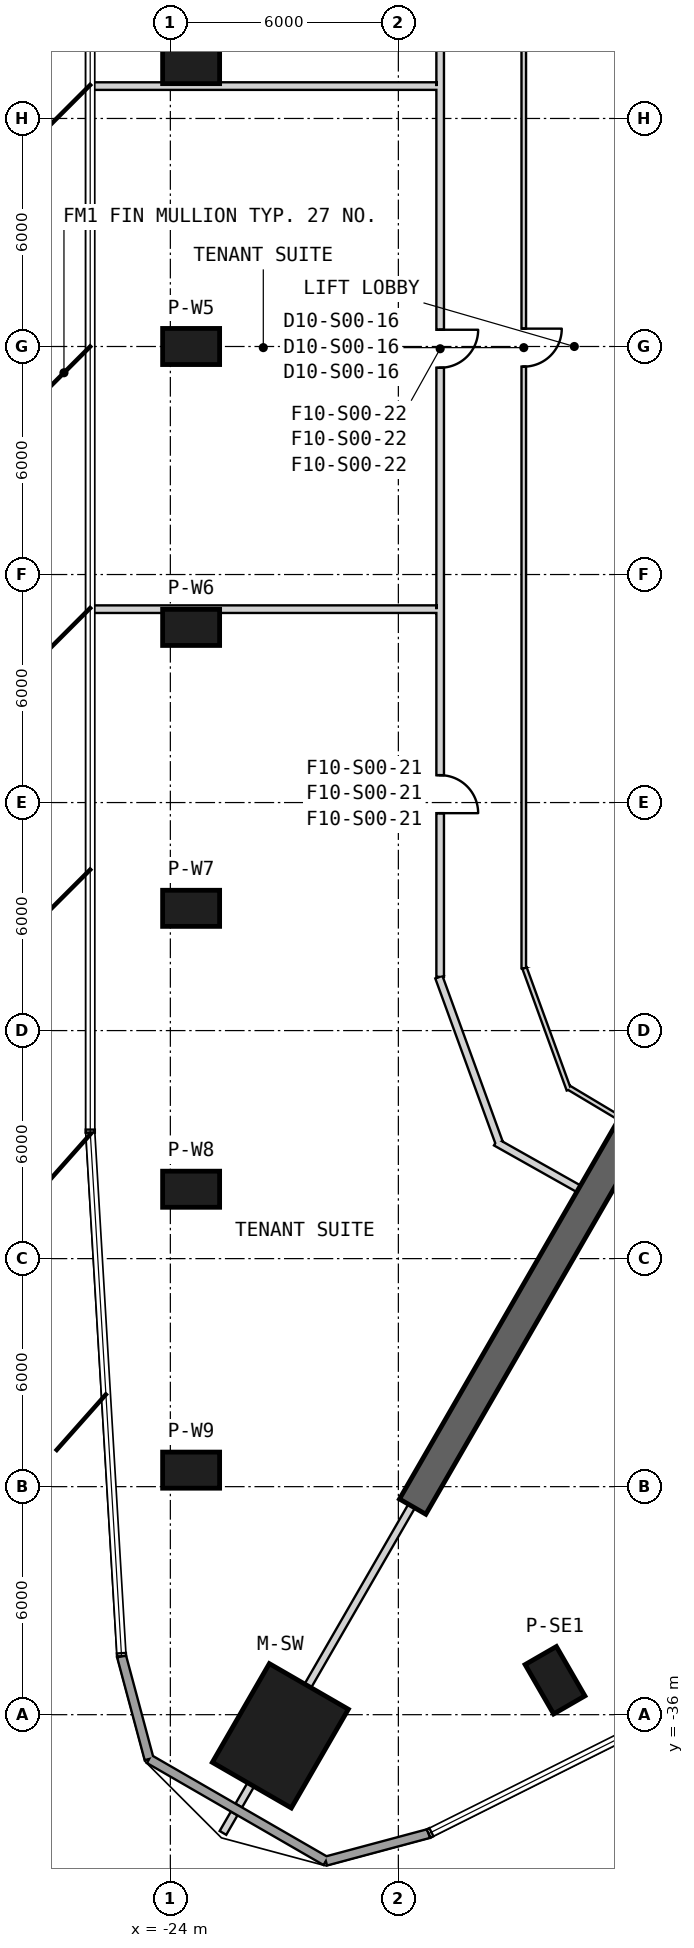
"""IFC4 building model, lengths in metres.
Left out: names, types, materials, properties, quantities, classifications, styles, units other than length and angle.
Written with IfcOpenShell. Run it as: python <this file> out.ifc"""

import sys

from ifc_helpers import new_model, si_unit, direction, frame, frame_2d, origin, origin_2d, place, context, subcontext, project, spatial, rectangle, extrude, element, fill, save


model = new_model("IFC4")
c1 = context("Model", 3, precision=1e-05, world=origin(), true_north=direction((0.0, 1.0)))
c2 = subcontext(c1, "Body", "Model", "MODEL_VIEW")
j1 = project(units=[si_unit("LENGTHUNIT", "METRE"), si_unit("PLANEANGLEUNIT", "RADIAN")], contexts=[c1])
p1 = place(None, origin())
s1 = spatial("IfcSite", under=j1, at=p1, CompositionType="ELEMENT")
p2 = place(p1, origin())
s2 = spatial("IfcBuilding", under=s1, at=p2, CompositionType="ELEMENT")
p3 = place(p2, frame((0.0, 0.0, 45.5)))
s3 = spatial("IfcBuildingStorey", under=s2, at=p3, CompositionType="ELEMENT", Elevation=45.5)
p4 = place(p3, frame((-21.106, -36.556, 0.0), z_axis=(0.0, 0.0, 1.0), x_axis=(-0.5, -0.866025403784, 0.0)))
e1 = element("IfcColumn", 1, at=p4, inside=s3, PredefinedType="COLUMN", context=c2, shape_type="SweptSolid", body=[
    extrude(rectangle(XDim=3.0, YDim=2.4, at=origin_2d()), origin(), (0.0, 0.0, 1.0), 4.1),
])
for number, where, z_axis, x_axis in (
    (2, (-23.453, 7.391, -0.3), (0.0, 0.0, 1.0), (-1.0, 0.0, 0.0)),
    (3, (-23.453, 0.0, -0.3), (0.0, 0.0, 1.0), (-1.0, 0.0, 0.0)),
    (4, (-23.453, -7.391, -0.3), (0.0, 0.0, 1.0), (-1.0, 0.0, 0.0)),
):
    element("IfcColumn", number, at=place(p3, frame(where, z_axis=z_axis, x_axis=x_axis)), inside=s3, PredefinedType="COLUMN", context=c2, shape_type="SweptSolid", body=[
        extrude(rectangle(XDim=1.5, YDim=0.95, at=origin_2d()), origin(), (0.0, 0.0, 1.0), 4.4),
    ])
for number, where, z_axis, x_axis in (
    (5, (-23.453, -14.783, 0.0), (0.0, 0.0, 1.0), (-1.0, 0.0, 0.0)),
    (6, (-23.453, -22.174, 0.0), (0.0, 0.0, 1.0), (-1.0, 0.0, 0.0)),
    (7, (-23.453, -29.566, 0.0), (0.0, 0.0, 1.0), (-1.0, 0.0, 0.0)),
    (8, (-13.878, -35.094, 0.0), (0.0, 0.0, 1.0), (0.5, -0.866, 0.0)),
):
    element("IfcColumn", number, at=place(p3, frame(where, z_axis=z_axis, x_axis=x_axis)), inside=s3, PredefinedType="COLUMN", context=c2, shape_type="SweptSolid", body=[
        extrude(rectangle(XDim=1.5, YDim=0.95, at=origin_2d()), origin(), (0.0, 0.0, 1.0), 4.1),
    ])
p5 = place(p3, frame((-10.575, -18.316, 0.0), z_axis=(0.0, 0.0, 1.0), x_axis=(-0.499996272984, -0.866027555568, 0.0)))
e9 = element("IfcWall", 9, at=p5, inside=s3, PredefinedType="SHEAR", context=c2, shape_type="SweptSolid", body=[
    extrude(rectangle(XDim=14.098, YDim=0.8, at=frame_2d((7.049, 0.0))), origin(), (0.0, 0.0, 1.0), 4.1),
])
p6 = place(p5, frame((0.7, 0.0, 0.0)))
e10 = element("IfcOpeningElement", 10, at=p6, cuts=e9, PredefinedType="OPENING", context=c2, shape_type="SweptSolid", body=[
    extrude(rectangle(XDim=1.4, YDim=2.4, at=frame_2d((0.7, 1.2))), frame((0.0, 0.41, 0.0), z_axis=(0.0, -1.0, 0.0), x_axis=(1.0, 0.0, 0.0)), (0.0, 0.0, 1.0), 0.82),
])
p7 = place(p3, frame((-25.284, -34.462, 0.0), z_axis=(0.0, 0.0, 1.0), x_axis=(0.258850842196, -0.965917305723, 0.0)))
e11 = element("IfcWall", 11, at=p7, inside=s3, PredefinedType="SOLIDWALL", context=c2, shape_type="SweptSolid", body=[
    extrude(rectangle(XDim=2.8, YDim=0.24, at=frame_2d((1.4, 0.0))), origin(), (0.0, 0.0, 1.0), 3.8),
])
p8 = place(p3, frame((-24.56, -37.167, 0.0), z_axis=(0.0, 0.0, 1.0), x_axis=(0.866010734295, -0.500025407441, 0.0)))
e12 = element("IfcWall", 12, at=p8, inside=s3, PredefinedType="SOLIDWALL", context=c2, shape_type="SweptSolid", body=[
    extrude(rectangle(XDim=5.371, YDim=0.24, at=frame_2d((2.686, 0.0))), origin(), (0.0, 0.0, 1.0), 3.8),
])
p9 = place(p3, frame((-19.908, -39.853, 0.0), z_axis=(0.0, 0.0, 1.0), x_axis=(0.965923146675, 0.25882904535, 0.0)))
e13 = element("IfcWall", 13, at=p9, inside=s3, PredefinedType="SOLIDWALL", context=c2, shape_type="SweptSolid", body=[
    extrude(rectangle(XDim=2.801, YDim=0.24, at=frame_2d((1.4, 0.0))), origin(), (0.0, 0.0, 1.0), 3.8),
])
p10 = place(p3, frame((-14.7, 16.24, 0.0), z_axis=(0.0, 0.0, 1.0), x_axis=(0.0, -1.0, 0.0)))
e14 = element("IfcWall", 14, at=p10, inside=s3, PredefinedType="PARTITIONING", context=c2, shape_type="SweptSolid", body=[
    extrude(rectangle(XDim=32.599, YDim=0.12, at=frame_2d((16.299, 0.0))), origin(), (0.0, 0.0, 1.0), 2.98),
])
p11 = place(p10, frame((15.77, 0.0, 0.0)))
e15 = element("IfcOpeningElement", 15, at=p11, cuts=e14, PredefinedType="OPENING", context=c2, shape_type="SweptSolid", body=[
    extrude(rectangle(XDim=1.0, YDim=2.1, at=frame_2d((0.5, 1.05))), frame((0.0, 0.07, 0.0), z_axis=(0.0, -1.0, 0.0), x_axis=(1.0, 0.0, 0.0)), (0.0, 0.0, 1.0), 0.14),
])
p12 = place(p3, frame((-14.679, -16.356, 0.0), z_axis=(0.0, 0.0, 1.0), x_axis=(0.342002052592, -0.939699205077, 0.0)))
e16 = element("IfcWall", 16, at=p12, inside=s3, PredefinedType="PARTITIONING", context=c2, shape_type="SweptSolid", body=[
    extrude(rectangle(XDim=3.406, YDim=0.12, at=frame_2d((1.703, 0.0))), origin(), (0.0, 0.0, 1.0), 2.88),
])
p13 = place(p3, frame((-13.516, -19.501, 0.0), z_axis=(0.0, 0.0, 1.0), x_axis=(0.858336816023, -0.513086649856, 0.0)))
e17 = element("IfcWall", 17, at=p13, inside=s3, PredefinedType="PARTITIONING", context=c2, shape_type="SweptSolid", body=[
    extrude(rectangle(XDim=1.555, YDim=0.12, at=frame_2d((0.777, 0.0))), origin(), (0.0, 0.0, 1.0), 3.8),
])
p14 = place(p3, frame((-15.435, -20.935, 0.0), z_axis=(0.0, 0.0, 1.0), x_axis=(0.871392892797, -0.490585799206, 0.0)))
e18 = element("IfcWall", 18, at=p14, inside=s3, PredefinedType="PARTITIONING", context=c2, shape_type="SweptSolid", body=[
    extrude(rectangle(XDim=2.5, YDim=0.2, at=frame_2d((1.25, 0.0))), origin(), (0.0, 0.0, 1.0), 3.8),
])
p15 = place(p3, frame((-16.934, -16.594, 0.0), z_axis=(0.0, 0.0, 1.0), x_axis=(0.342009657388, -0.939696437289, 0.0)))
e19 = element("IfcWall", 19, at=p15, inside=s3, PredefinedType="PARTITIONING", context=c2, shape_type="SweptSolid", body=[
    extrude(rectangle(XDim=4.632, YDim=0.2, at=frame_2d((2.316, 0.0))), origin(), (0.0, 0.0, 1.0), 2.88),
])
p16 = place(p3, frame((-16.9, 16.787, 0.0), z_axis=(0.0, 0.0, 1.0), x_axis=(0.0, -1.0, 0.0)))
e20 = element("IfcWall", 20, at=p16, inside=s3, PredefinedType="PARTITIONING", context=c2, shape_type="SweptSolid", body=[
    extrude(rectangle(XDim=33.375, YDim=0.2, at=frame_2d((16.688, 0.0))), origin(), (0.0, 0.0, 1.0), 2.98),
])
p17 = place(p16, frame((28.067, 0.0, 0.0)))
e21 = element("IfcOpeningElement", 21, at=p17, cuts=e20, PredefinedType="OPENING", context=c2, shape_type="SweptSolid", body=[
    extrude(rectangle(XDim=1.0, YDim=2.1, at=frame_2d((0.5, 1.05))), frame((0.0, 0.11, 0.0), z_axis=(0.0, -1.0, 0.0), x_axis=(1.0, 0.0, 0.0)), (0.0, 0.0, 1.0), 0.22),
])
p18 = place(p16, frame((16.347, 0.0, 0.0)))
e22 = element("IfcOpeningElement", 22, at=p18, cuts=e20, PredefinedType="OPENING", context=c2, shape_type="SweptSolid", body=[
    extrude(rectangle(XDim=1.0, YDim=2.1, at=frame_2d((0.5, 1.05))), frame((0.0, 0.11, 0.0), z_axis=(0.0, -1.0, 0.0), x_axis=(1.0, 0.0, 0.0)), (0.0, 0.0, 1.0), 0.22),
])
p19 = place(p16, frame((4.518, 0.0, 0.0)))
e23 = element("IfcOpeningElement", 23, at=p19, cuts=e20, PredefinedType="OPENING", context=c2, shape_type="SweptSolid", body=[
    extrude(rectangle(XDim=1.0, YDim=2.1, at=frame_2d((0.5, 1.05))), frame((0.0, 0.11, 0.0), z_axis=(0.0, -1.0, 0.0), x_axis=(1.0, 0.0, 0.0)), (0.0, 0.0, 1.0), 0.22),
])
p20 = place(p3, frame((-17.0, -6.911, 0.0), z_axis=(0.0, 0.0, 1.0), x_axis=(-0.999999996767, -8.0416019e-05, 0.0)))
e24 = element("IfcWall", 24, at=p20, inside=s3, PredefinedType="PARTITIONING", context=c2, shape_type="SweptSolid", body=[
    extrude(rectangle(XDim=9.108, YDim=0.2, at=frame_2d((4.554, 0.0))), origin(), (0.0, 0.0, 1.0), 3.08),
])
p21 = place(p3, frame((-17.65, -30.511, 0.0), z_axis=(0.0, 0.0, 1.0), x_axis=(-0.499984217882, -0.866034515403, 0.0)))
e25 = element("IfcWall", 25, at=p21, inside=s3, PredefinedType="PARTITIONING", context=c2, shape_type="SweptSolid", body=[
    extrude(rectangle(XDim=5.463, YDim=0.2, at=frame_2d((2.731, 0.0))), origin(), (0.0, 0.0, 1.0), 3.37),
])
p22 = place(p3, frame((-21.882, -37.84, 0.0), z_axis=(0.0, 0.0, 1.0), x_axis=(-0.499977104415, -0.866038622153, 0.0)))
e26 = element("IfcWall", 26, at=p22, inside=s3, PredefinedType="PARTITIONING", context=c2, shape_type="SweptSolid", body=[
    extrude(rectangle(XDim=0.636, YDim=0.2, at=frame_2d((0.318, 0.0))), origin(), (0.0, 0.0, 1.0), 3.8),
])
p23 = place(p3, frame((-22.32, -38.599, 0.0), z_axis=(0.0, 0.0, 1.0), x_axis=(-0.500222587251, -0.865896854829, 0.0)))
e27 = element("IfcWall", 27, at=p23, inside=s3, PredefinedType="PARTITIONING", context=c2, shape_type="SweptSolid", body=[
    extrude(rectangle(XDim=0.592, YDim=0.2, at=frame_2d((0.296, 0.0))), origin(), (0.0, 0.0, 1.0), 3.8),
])
p24 = place(p3, frame((-26.109, 6.852, 0.0), z_axis=(0.0, 0.0, 1.0), x_axis=(0.999999998563, 5.3604932e-05, 0.0)))
e28 = element("IfcWall", 28, at=p24, inside=s3, PredefinedType="PARTITIONING", context=c2, shape_type="SweptSolid", body=[
    extrude(rectangle(XDim=9.109, YDim=0.2, at=frame_2d((4.554, 0.0))), origin(), (0.0, 0.0, 1.0), 3.08),
])
p25 = place(p11, origin())
e29 = element("IfcDoor", 29, at=p25, inside=s3, OperationType="SINGLE_SWING_RIGHT", PredefinedType="NOTDEFINED", context=c2, shape_type="SweptSolid", body=[
    extrude(rectangle(XDim=1.0, YDim=2.1, at=frame_2d((0.5, 1.05))), frame((0.0, 0.025, 0.0), z_axis=(0.0, -1.0, 0.0), x_axis=(1.0, 0.0, 0.0)), (0.0, 0.0, 1.0), 0.05),
])
fill(e15, e29)
p26 = place(p17, origin())
e30 = element("IfcDoor", 30, at=p26, inside=s3, OperationType="SINGLE_SWING_RIGHT", PredefinedType="USERDEFINED", context=c2, shape_type="SweptSolid", body=[
    extrude(rectangle(XDim=1.0, YDim=2.1, at=frame_2d((0.5, 1.05))), frame((0.0, 0.025, 0.0), z_axis=(0.0, -1.0, 0.0), x_axis=(1.0, 0.0, 0.0)), (0.0, 0.0, 1.0), 0.05),
])
fill(e21, e30)
p27 = place(p18, origin())
e31 = element("IfcDoor", 31, at=p27, inside=s3, OperationType="SINGLE_SWING_LEFT", PredefinedType="USERDEFINED", context=c2, shape_type="SweptSolid", body=[
    extrude(rectangle(XDim=1.0, YDim=2.1, at=frame_2d((0.5, 1.05))), frame((0.0, 0.025, 0.0), z_axis=(0.0, -1.0, 0.0), x_axis=(1.0, 0.0, 0.0)), (0.0, 0.0, 1.0), 0.05),
])
fill(e22, e31)
save(model, sys.argv[1])
